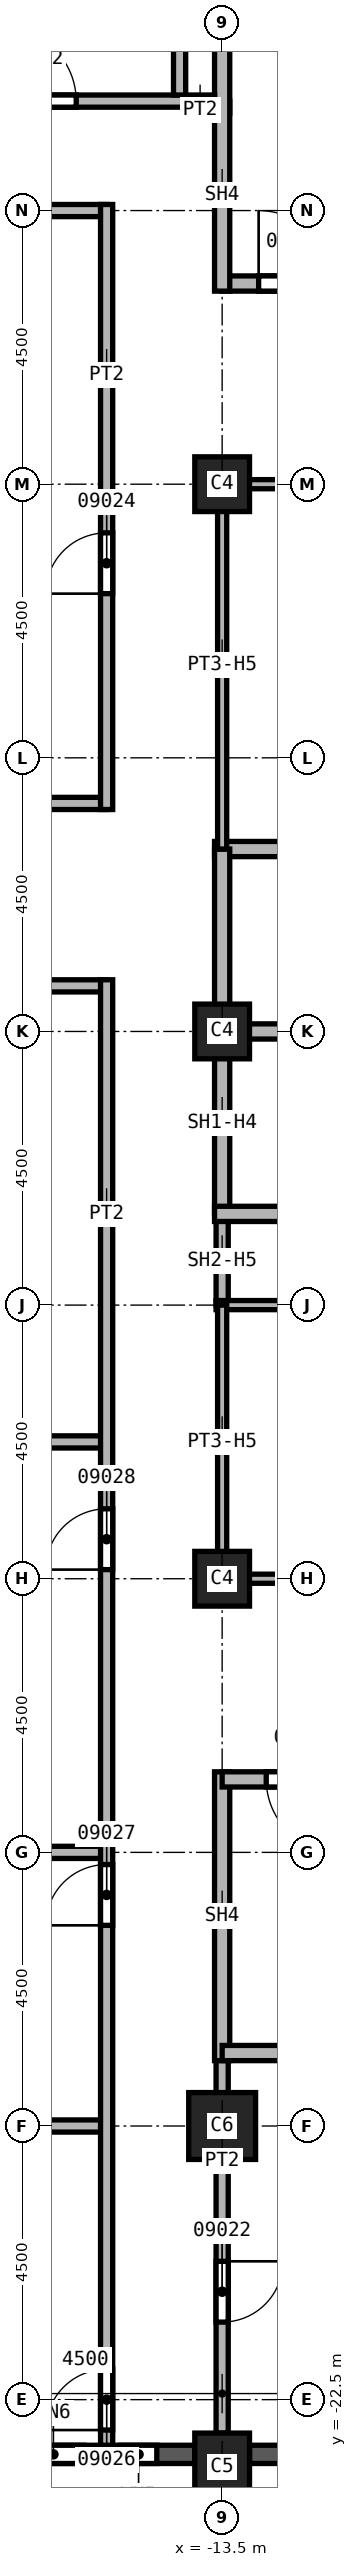
"""IFC4 building model, lengths in metres.
Left out: names, types, materials, properties, quantities, classifications, styles, units other than length and angle.
Written with IfcOpenShell. Run it as: python <this file> out.ifc"""

import sys

from ifc_helpers import new_model, si_unit, direction, frame, frame_2d, origin, origin_2d, place, context, subcontext, project, spatial, rectangle, extrude, element, fill, save


model = new_model("IFC4")
c1 = context("Model", 3, precision=1e-05, world=origin(), true_north=direction((0.0, 1.0)))
c2 = subcontext(c1, "Body", "Model", "MODEL_VIEW")
j1 = project(units=[si_unit("LENGTHUNIT", "METRE"), si_unit("PLANEANGLEUNIT", "RADIAN")], contexts=[c1])
p1 = place(None, origin())
s1 = spatial("IfcSite", under=j1, at=p1, CompositionType="ELEMENT")
p2 = place(p1, origin())
s2 = spatial("IfcBuilding", under=s1, at=p2, CompositionType="ELEMENT")
p3 = place(p2, frame((0.0, 0.0, 166.0)))
s3 = spatial("IfcBuildingStorey", under=s2, at=p3, CompositionType="ELEMENT", Elevation=166.0)
p4 = place(p3, frame((-13.5, -18.0, 0.0), z_axis=(0.0, 0.0, 1.0), x_axis=(1.0, 0.0, 0.0)))
e1 = element("IfcColumn", 1, at=p4, inside=s3, PredefinedType="COLUMN", context=c2, shape_type="SweptSolid", body=[
    extrude(rectangle(XDim=1.1, YDim=1.1, at=origin_2d()), origin(), (0.0, 0.0, 1.0), 3.7),
])
for number, where, z_axis, x_axis in (
    (2, (-13.5, 0.0, 0.0), (0.0, 0.0, 1.0), (1.0, 0.0, 0.0)),
    (3, (-13.5, 9.0, 0.0), (0.0, 0.0, 1.0), (1.0, 0.0, 0.0)),
    (4, (-13.5, -9.0, 0.0), (0.0, 0.0, 1.0), (1.0, 0.0, 0.0)),
):
    element("IfcColumn", number, at=place(p3, frame(where, z_axis=z_axis, x_axis=x_axis)), inside=s3, PredefinedType="COLUMN", context=c2, shape_type="SweptSolid", body=[
        extrude(rectangle(XDim=0.9, YDim=0.9, at=origin_2d()), origin(), (0.0, 0.0, 1.0), 3.7),
    ])
p5 = place(p3, frame((-13.5, -23.6, 0.0), z_axis=(0.0, 0.0, 1.0), x_axis=(1.0, 0.0, 0.0)))
e5 = element("IfcColumn", 5, at=p5, inside=s3, PredefinedType="COLUMN", context=c2, shape_type="SweptSolid", body=[
    extrude(rectangle(XDim=0.9, YDim=1.1, at=origin_2d()), origin(), (0.0, 0.0, 1.0), 3.7),
])
p6 = place(p3, frame((-17.55, -23.4, 0.0), z_axis=(0.0, 0.0, 1.0), x_axis=(1.0, 0.0, 0.0)))
e6 = element("IfcWall", 6, at=p6, inside=s3, PredefinedType="SOLIDWALL", context=c2, shape_type="SweptSolid", body=[
    extrude(rectangle(XDim=3.6, YDim=0.3, at=frame_2d((1.8, 0.0))), origin(), (0.0, 0.0, 1.0), 3.1),
])
p7 = place(p6, frame((0.775, 0.0, 0.8)))
e7 = element("IfcOpeningElement", 7, at=p7, cuts=e6, PredefinedType="OPENING", context=c2, shape_type="SweptSolid", body=[
    extrude(rectangle(XDim=1.0, YDim=1.95, at=frame_2d((0.5, 0.975))), frame((0.0, 0.15, 0.0), z_axis=(0.0, -1.0, 0.0), x_axis=(1.0, 0.0, 0.0)), (0.0, 0.0, 1.0), 0.3),
])
p8 = place(p6, frame((2.375, 0.0, 0.8)))
e8 = element("IfcOpeningElement", 8, at=p8, cuts=e6, PredefinedType="OPENING", context=c2, shape_type="SweptSolid", body=[
    extrude(rectangle(XDim=0.6, YDim=1.95, at=frame_2d((0.3, 0.975))), frame((0.0, 0.15, 0.0), z_axis=(0.0, -1.0, 0.0), x_axis=(1.0, 0.0, 0.0)), (0.0, 0.0, 1.0), 0.3),
])
p9 = place(p3, frame((-13.05, -23.4, 0.0), z_axis=(0.0, 0.0, 1.0), x_axis=(1.0, 0.0, 0.0)))
e9 = element("IfcWall", 9, at=p9, inside=s3, PredefinedType="SOLIDWALL", context=c2, shape_type="SweptSolid", body=[
    extrude(rectangle(XDim=3.6, YDim=0.3, at=frame_2d((1.8, 0.0))), origin(), (0.0, 0.0, 1.0), 3.1),
])
p10 = place(p9, frame((0.6, 0.0, 0.8)))
e10 = element("IfcOpeningElement", 10, at=p10, cuts=e9, PredefinedType="OPENING", context=c2, shape_type="SweptSolid", body=[
    extrude(rectangle(XDim=2.4, YDim=1.95, at=frame_2d((1.2, 0.975))), frame((0.0, 0.15, 0.0), z_axis=(0.0, -1.0, 0.0), x_axis=(1.0, 0.0, 0.0)), (0.0, 0.0, 1.0), 0.3),
])
p11 = place(p3, frame((-33.85, 3.75, 0.0), z_axis=(0.0, 0.0, 1.0), x_axis=(1.0, 0.0, 0.0)))
e11 = element("IfcWall", 11, at=p11, inside=s3, PredefinedType="PARTITIONING", context=c2, shape_type="SweptSolid", body=[
    extrude(rectangle(XDim=18.45, YDim=0.2, at=frame_2d((9.225, 0.0))), origin(), (0.0, 0.0, 1.0), 3.7),
])
p12 = place(p11, frame((2.5, 0.0, 0.0)))
e12 = element("IfcOpeningElement", 12, at=p12, cuts=e11, PredefinedType="OPENING", context=c2, shape_type="SweptSolid", body=[
    extrude(rectangle(XDim=1.0, YDim=2.1, at=frame_2d((0.5, 1.05))), frame((0.0, 0.1, 0.0), z_axis=(0.0, -1.0, 0.0), x_axis=(1.0, 0.0, 0.0)), (0.0, 0.0, 1.0), 0.2),
])
for number, where, z_axis, x_axis in (
    (13, (-27.1, -13.5, 0.0), (0.0, 0.0, 1.0), (1.0, 0.0, 0.0)),
    (14, (-27.1, -6.75, 0.0), (0.0, 0.0, 1.0), (1.0, 0.0, 0.0)),
):
    element("IfcWall", number, at=place(p3, frame(where, z_axis=z_axis, x_axis=x_axis)), inside=s3, PredefinedType="PARTITIONING", context=c2, shape_type="SweptSolid", body=[
        extrude(rectangle(XDim=11.7, YDim=0.2, at=frame_2d((5.85, 0.0))), origin(), (0.0, 0.0, 1.0), 3.7),
    ])
p13 = place(p3, frame((-15.4, 0.75, 0.0), z_axis=(0.0, 0.0, 1.0), x_axis=(-1.0, 0.0, 0.0)))
e15 = element("IfcWall", 15, at=p13, inside=s3, PredefinedType="PARTITIONING", context=c2, shape_type="SweptSolid", body=[
    extrude(rectangle(XDim=18.45, YDim=0.2, at=frame_2d((9.225, 0.0))), origin(), (0.0, 0.0, 1.0), 3.7),
])
p14 = place(p13, frame((5.35, 0.0, 0.0)))
e16 = element("IfcOpeningElement", 16, at=p14, cuts=e15, PredefinedType="OPENING", context=c2, shape_type="SweptSolid", body=[
    extrude(rectangle(XDim=1.0, YDim=2.1, at=frame_2d((0.5, 1.05))), frame((0.0, 0.1, 0.0), z_axis=(0.0, -1.0, 0.0), x_axis=(1.0, 0.0, 0.0)), (0.0, 0.0, 1.0), 0.2),
])
p15 = place(p3, frame((-24.2, -18.0, 0.0), z_axis=(0.0, 0.0, 1.0), x_axis=(1.0, 0.0, 0.0)))
e17 = element("IfcWall", 17, at=p15, inside=s3, PredefinedType="PARTITIONING", context=c2, shape_type="SweptSolid", body=[
    extrude(rectangle(XDim=8.8, YDim=0.2, at=frame_2d((4.4, 0.0))), origin(), (0.0, 0.0, 1.0), 3.7),
])
p16 = place(p3, frame((-15.4, 13.5, 0.0), z_axis=(0.0, 0.0, 1.0), x_axis=(-1.0, 0.0, 0.0)))
e18 = element("IfcWall", 18, at=p16, inside=s3, PredefinedType="PARTITIONING", context=c2, shape_type="SweptSolid", body=[
    extrude(rectangle(XDim=6.6, YDim=0.2, at=frame_2d((3.3, 0.0))), origin(), (0.0, 0.0, 1.0), 3.7),
])
p17 = place(p3, frame((-15.4, -23.25, 0.0), z_axis=(0.0, 0.0, 1.0), x_axis=(0.0, 1.0, 0.0)))
e19 = element("IfcWall", 19, at=p17, inside=s3, PredefinedType="PARTITIONING", context=c2, shape_type="SweptSolid", body=[
    extrude(rectangle(XDim=24.1, YDim=0.2, at=frame_2d((12.05, 0.0))), origin(), (0.0, 0.0, 1.0), 3.7),
])
p18 = place(p17, frame((0.25, 0.0, 0.0)))
e20 = element("IfcOpeningElement", 20, at=p18, cuts=e19, PredefinedType="OPENING", context=c2, shape_type="SweptSolid", body=[
    extrude(rectangle(XDim=1.0, YDim=2.1, at=frame_2d((0.5, 1.05))), frame((0.0, 0.1, 0.0), z_axis=(0.0, -1.0, 0.0), x_axis=(1.0, 0.0, 0.0)), (0.0, 0.0, 1.0), 0.2),
])
p19 = place(p17, frame((8.55, 0.0, 0.0)))
e21 = element("IfcOpeningElement", 21, at=p19, cuts=e19, PredefinedType="OPENING", context=c2, shape_type="SweptSolid", body=[
    extrude(rectangle(XDim=1.0, YDim=2.1, at=frame_2d((0.5, 1.05))), frame((0.0, 0.1, 0.0), z_axis=(0.0, -1.0, 0.0), x_axis=(1.0, 0.0, 0.0)), (0.0, 0.0, 1.0), 0.2),
])
p20 = place(p17, frame((14.4, 0.0, 0.0)))
e22 = element("IfcOpeningElement", 22, at=p20, cuts=e19, PredefinedType="OPENING", context=c2, shape_type="SweptSolid", body=[
    extrude(rectangle(XDim=1.0, YDim=2.1, at=frame_2d((0.5, 1.05))), frame((0.0, 0.1, 0.0), z_axis=(0.0, -1.0, 0.0), x_axis=(1.0, 0.0, 0.0)), (0.0, 0.0, 1.0), 0.2),
])
p21 = place(p3, frame((-15.4, 3.65, 0.0), z_axis=(0.0, 0.0, 1.0), x_axis=(0.0, 1.0, 0.0)))
e23 = element("IfcWall", 23, at=p21, inside=s3, PredefinedType="PARTITIONING", context=c2, shape_type="SweptSolid", body=[
    extrude(rectangle(XDim=9.95, YDim=0.2, at=frame_2d((4.975, 0.0))), origin(), (0.0, 0.0, 1.0), 3.7),
])
p22 = place(p21, frame((3.55, 0.0, 0.0)))
e24 = element("IfcOpeningElement", 24, at=p22, cuts=e23, PredefinedType="OPENING", context=c2, shape_type="SweptSolid", body=[
    extrude(rectangle(XDim=1.0, YDim=2.1, at=frame_2d((0.5, 1.05))), frame((0.0, 0.1, 0.0), z_axis=(0.0, -1.0, 0.0), x_axis=(1.0, 0.0, 0.0)), (0.0, 0.0, 1.0), 0.2),
])
p23 = place(p3, frame((-14.1, 15.2, 0.0), z_axis=(0.0, 0.0, 1.0), x_axis=(1.0, 0.0, 0.0)))
e25 = element("IfcWall", 25, at=p23, inside=s3, PredefinedType="PARTITIONING", context=c2, shape_type="SweptSolid", body=[
    extrude(rectangle(XDim=0.725, YDim=0.2, at=frame_2d((0.363, 0.0))), origin(), (0.0, 0.0, 1.0), 3.7),
])
p24 = place(p3, frame((-13.5, -16.675, 0.0), z_axis=(0.0, 0.0, 1.0), x_axis=(0.0, -1.0, 0.0)))
e26 = element("IfcWall", 26, at=p24, inside=s3, PredefinedType="PARTITIONING", context=c2, shape_type="SweptSolid", body=[
    extrude(rectangle(XDim=6.375, YDim=0.2, at=frame_2d((3.188, 0.0))), origin(), (0.0, 0.0, 1.0), 3.7),
])
p25 = place(p24, frame((3.55, 0.0, 0.0)))
e27 = element("IfcOpeningElement", 27, at=p25, cuts=e26, PredefinedType="OPENING", context=c2, shape_type="SweptSolid", body=[
    extrude(rectangle(XDim=1.0, YDim=2.1, at=frame_2d((0.5, 1.05))), frame((0.0, 0.1, 0.0), z_axis=(0.0, -1.0, 0.0), x_axis=(1.0, 0.0, 0.0)), (0.0, 0.0, 1.0), 0.2),
])
p26 = place(p3, frame((-13.5, -4.5, 0.0), z_axis=(0.0, 0.0, 1.0), x_axis=(0.0, 1.0, 0.0)))
e28 = element("IfcWall", 28, at=p26, inside=s3, PredefinedType="SOLIDWALL", context=c2, shape_type="SweptSolid", body=[
    extrude(rectangle(XDim=1.5, YDim=0.2, at=frame_2d((0.75, 0.0))), origin(), (0.0, 0.0, 1.0), 2.938),
])
p27 = place(p3, frame((-13.625, 0.0, 0.0), z_axis=(0.0, 0.0, 1.0), x_axis=(1.0, 0.0, 0.0)))
e29 = element("IfcWall", 29, at=p27, inside=s3, PredefinedType="SOLIDWALL", context=c2, shape_type="SweptSolid", body=[
    extrude(rectangle(XDim=3.125, YDim=0.25, at=frame_2d((1.562, 0.0))), origin(), (0.0, 0.0, 1.0), 3.7),
])
p28 = place(p3, frame((-13.625, 3.0, 0.0), z_axis=(0.0, 0.0, 1.0), x_axis=(1.0, 0.0, 0.0)))
e30 = element("IfcWall", 30, at=p28, inside=s3, PredefinedType="SOLIDWALL", context=c2, shape_type="SweptSolid", body=[
    extrude(rectangle(XDim=6.125, YDim=0.25, at=frame_2d((3.062, 0.0))), origin(), (0.0, 0.0, 1.0), 3.7),
])
p29 = place(p28, frame((3.25, 0.0, 0.0)))
e31 = element("IfcOpeningElement", 31, at=p29, cuts=e30, PredefinedType="OPENING", context=c2, shape_type="SweptSolid", body=[
    extrude(rectangle(XDim=1.1, YDim=2.1, at=frame_2d((0.55, 1.05))), frame((0.0, 0.125, 0.0), z_axis=(0.0, -1.0, 0.0), x_axis=(1.0, 0.0, 0.0)), (0.0, 0.0, 1.0), 0.25),
])
p30 = place(p3, frame((-13.5, -3.0, 0.0), z_axis=(0.0, 0.0, 1.0), x_axis=(0.0, 1.0, 0.0)))
e32 = element("IfcWall", 32, at=p30, inside=s3, PredefinedType="SOLIDWALL", context=c2, shape_type="SweptSolid", body=[
    extrude(rectangle(XDim=6.0, YDim=0.25, at=frame_2d((3.0, 0.0))), origin(), (0.0, 0.0, 1.0), 2.938),
])
p31 = place(p3, frame((-13.625, -3.0, 0.0), z_axis=(0.0, 0.0, 1.0), x_axis=(1.0, 0.0, 0.0)))
e33 = element("IfcWall", 33, at=p31, inside=s3, PredefinedType="SOLIDWALL", context=c2, shape_type="SweptSolid", body=[
    extrude(rectangle(XDim=9.25, YDim=0.25, at=frame_2d((4.625, 0.0))), origin(), (0.0, 0.0, 1.0), 3.7),
])
p32 = place(p31, frame((3.25, 0.0, 0.0)))
e34 = element("IfcOpeningElement", 34, at=p32, cuts=e33, PredefinedType="OPENING", context=c2, shape_type="SweptSolid", body=[
    extrude(rectangle(XDim=1.1, YDim=2.1, at=frame_2d((0.55, 1.05))), frame((0.0, 0.125, 0.0), z_axis=(0.0, -1.0, 0.0), x_axis=(1.0, 0.0, 0.0)), (0.0, 0.0, 1.0), 0.25),
])
p33 = place(p3, frame((-13.5, -12.175, 0.0), z_axis=(0.0, 0.0, 1.0), x_axis=(0.0, -1.0, 0.0)))
e35 = element("IfcWall", 35, at=p33, inside=s3, PredefinedType="SOLIDWALL", context=c2, shape_type="SweptSolid", body=[
    extrude(rectangle(XDim=4.75, YDim=0.25, at=frame_2d((2.375, 0.0))), origin(), (0.0, 0.0, 1.0), 3.7),
])
p34 = place(p3, frame((-13.5, 12.3, 0.0), z_axis=(0.0, 0.0, 1.0), x_axis=(1.0, 0.0, 0.0)))
e36 = element("IfcWall", 36, at=p34, inside=s3, PredefinedType="SOLIDWALL", context=c2, shape_type="SweptSolid", body=[
    extrude(rectangle(XDim=9.125, YDim=0.25, at=frame_2d((4.562, 0.0))), origin(), (0.0, 0.0, 1.0), 3.7),
])
p35 = place(p34, frame((0.6, 0.0, 0.0)))
e37 = element("IfcOpeningElement", 37, at=p35, cuts=e36, PredefinedType="OPENING", context=c2, shape_type="SweptSolid", body=[
    extrude(rectangle(XDim=1.2, YDim=2.1, at=frame_2d((0.6, 1.05))), frame((0.0, 0.125, 0.0), z_axis=(0.0, -1.0, 0.0), x_axis=(1.0, 0.0, 0.0)), (0.0, 0.0, 1.0), 0.25),
])
p36 = place(p3, frame((-13.5, 12.175, 0.0), z_axis=(0.0, 0.0, 1.0), x_axis=(0.0, 1.0, 0.0)))
e38 = element("IfcWall", 38, at=p36, inside=s3, PredefinedType="SOLIDWALL", context=c2, shape_type="SweptSolid", body=[
    extrude(rectangle(XDim=4.75, YDim=0.25, at=frame_2d((2.375, 0.0))), origin(), (0.0, 0.0, 1.0), 3.7),
])
p37 = place(p3, frame((-4.5, -16.8, 0.0), z_axis=(0.0, 0.0, 1.0), x_axis=(-1.0, 0.0, 0.0)))
e39 = element("IfcWall", 39, at=p37, inside=s3, PredefinedType="SOLIDWALL", context=c2, shape_type="SweptSolid", body=[
    extrude(rectangle(XDim=9.0, YDim=0.25, at=frame_2d((4.5, 0.0))), origin(), (0.0, 0.0, 1.0), 3.7),
])
p38 = place(p3, frame((-4.375, -12.3, 0.0), z_axis=(0.0, 0.0, 1.0), x_axis=(-1.0, 0.0, 0.0)))
e40 = element("IfcWall", 40, at=p38, inside=s3, PredefinedType="SOLIDWALL", context=c2, shape_type="SweptSolid", body=[
    extrude(rectangle(XDim=9.125, YDim=0.25, at=frame_2d((4.562, 0.0))), origin(), (0.0, 0.0, 1.0), 3.7),
])
p39 = place(p38, frame((7.2, 0.0, 0.0)))
e41 = element("IfcOpeningElement", 41, at=p39, cuts=e40, PredefinedType="OPENING", context=c2, shape_type="SweptSolid", body=[
    extrude(rectangle(XDim=1.2, YDim=2.1, at=frame_2d((0.6, 1.05))), frame((0.0, 0.125, 0.0), z_axis=(0.0, -1.0, 0.0), x_axis=(1.0, 0.0, 0.0)), (0.0, 0.0, 1.0), 0.25),
])
p40 = place(p3, frame((-13.6, -4.5, 0.0), z_axis=(0.0, 0.0, 1.0), x_axis=(1.0, 0.0, 0.0)))
e42 = element("IfcWall", 42, at=p40, inside=s3, PredefinedType="PARTITIONING", context=c2, shape_type="SweptSolid", body=[
    extrude(rectangle(XDim=3.1, YDim=0.15, at=frame_2d((1.55, 0.0))), origin(), (0.0, 0.0, 1.0), 3.7),
])
p41 = place(p3, frame((-13.5, -9.075, 0.0), z_axis=(0.0, 0.0, 1.0), x_axis=(0.0, 1.0, 0.0)))
e43 = element("IfcWall", 43, at=p41, inside=s3, PredefinedType="PARTITIONING", context=c2, shape_type="SweptSolid", body=[
    extrude(rectangle(XDim=4.575, YDim=0.15, at=frame_2d((2.288, 0.0))), origin(), (0.0, 0.0, 1.0), 2.938),
])
p42 = place(p3, frame((-13.5, 3.0, 0.0), z_axis=(0.0, 0.0, 1.0), x_axis=(0.0, 1.0, 0.0)))
e44 = element("IfcWall", 44, at=p42, inside=s3, PredefinedType="PARTITIONING", context=c2, shape_type="SweptSolid", body=[
    extrude(rectangle(XDim=6.075, YDim=0.15, at=frame_2d((3.038, 0.0))), origin(), (0.0, 0.0, 1.0), 2.938),
])
for number, where, z_axis, x_axis in (
    (45, (-13.5, 9.0, 0.0), (0.0, 0.0, 1.0), (1.0, 0.0, 0.0)),
    (46, (-10.5, -9.0, 0.0), (0.0, 0.0, 1.0), (-1.0, 0.0, 0.0)),
):
    element("IfcWall", number, at=place(p3, frame(where, z_axis=z_axis, x_axis=x_axis)), inside=s3, PredefinedType="PARTITIONING", context=c2, shape_type="SweptSolid", body=[
        extrude(rectangle(XDim=3.0, YDim=0.15, at=frame_2d((1.5, 0.0))), origin(), (0.0, 0.0, 1.0), 2.938),
    ])
p43 = place(p3, frame((-21.9, 15.3, 0.0), z_axis=(0.0, 0.0, 1.0), x_axis=(1.0, 0.0, 0.0)))
e47 = element("IfcWall", 47, at=p43, inside=s3, PredefinedType="SOLIDWALL", context=c2, shape_type="SweptSolid", body=[
    extrude(rectangle(XDim=8.275, YDim=0.2, at=frame_2d((4.137, 0.0))), origin(), (0.0, 0.0, 1.0), 3.7),
])
p44 = place(p43, frame((4.8, 0.0, 0.0)))
e48 = element("IfcOpeningElement", 48, at=p44, cuts=e47, PredefinedType="OPENING", context=c2, shape_type="SweptSolid", body=[
    extrude(rectangle(XDim=1.2, YDim=2.1, at=frame_2d((0.6, 1.05))), frame((0.0, 0.1, 0.0), z_axis=(0.0, -1.0, 0.0), x_axis=(1.0, 0.0, 0.0)), (0.0, 0.0, 1.0), 0.2),
])
p45 = place(p3, frame((-14.2, 15.4, 0.0), z_axis=(0.0, 0.0, 1.0), x_axis=(0.0, 1.0, 0.0)))
e49 = element("IfcWall", 49, at=p45, inside=s3, PredefinedType="SOLIDWALL", context=c2, shape_type="SweptSolid", body=[
    extrude(rectangle(XDim=5.9, YDim=0.2, at=frame_2d((2.95, 0.0))), origin(), (0.0, 0.0, 1.0), 3.7),
])
p46 = place(p35, origin())
e50 = element("IfcDoor", 50, at=p46, inside=s3, OperationType="SINGLE_SWING_LEFT", PredefinedType="DOOR", context=c2, shape_type="SweptSolid", body=[
    extrude(rectangle(XDim=1.2, YDim=2.1, at=frame_2d((0.6, 1.05))), frame((0.0, 0.025, 0.0), z_axis=(0.0, -1.0, 0.0), x_axis=(1.0, 0.0, 0.0)), (0.0, 0.0, 1.0), 0.05),
])
fill(e37, e50)
p47 = place(p39, origin())
e51 = element("IfcDoor", 51, at=p47, inside=s3, OperationType="SINGLE_SWING_RIGHT", PredefinedType="DOOR", context=c2, shape_type="SweptSolid", body=[
    extrude(rectangle(XDim=1.2, YDim=2.1, at=frame_2d((0.6, 1.05))), frame((0.0, 0.025, 0.0), z_axis=(0.0, -1.0, 0.0), x_axis=(1.0, 0.0, 0.0)), (0.0, 0.0, 1.0), 0.05),
])
fill(e41, e51)
p48 = place(p25, origin())
e52 = element("IfcDoor", 52, at=p48, inside=s3, OperationType="SINGLE_SWING_LEFT", PredefinedType="DOOR", context=c2, shape_type="SweptSolid", body=[
    extrude(rectangle(XDim=1.0, YDim=2.1, at=frame_2d((0.5, 1.05))), frame((0.0, 0.025, 0.0), z_axis=(0.0, -1.0, 0.0), x_axis=(1.0, 0.0, 0.0)), (0.0, 0.0, 1.0), 0.05),
])
fill(e27, e52)
p49 = place(p22, origin())
e53 = element("IfcDoor", 53, at=p49, inside=s3, OperationType="SINGLE_SWING_LEFT", PredefinedType="DOOR", context=c2, shape_type="SweptSolid", body=[
    extrude(rectangle(XDim=1.0, YDim=2.1, at=frame_2d((0.5, 1.05))), frame((0.0, 0.025, 0.0), z_axis=(0.0, -1.0, 0.0), x_axis=(1.0, 0.0, 0.0)), (0.0, 0.0, 1.0), 0.05),
])
fill(e24, e53)
p50 = place(p18, origin())
e54 = element("IfcDoor", 54, at=p50, inside=s3, OperationType="SINGLE_SWING_LEFT", PredefinedType="DOOR", context=c2, shape_type="SweptSolid", body=[
    extrude(rectangle(XDim=1.0, YDim=2.1, at=frame_2d((0.5, 1.05))), frame((0.0, 0.025, 0.0), z_axis=(0.0, -1.0, 0.0), x_axis=(1.0, 0.0, 0.0)), (0.0, 0.0, 1.0), 0.05),
])
fill(e20, e54)
p51 = place(p19, origin())
e55 = element("IfcDoor", 55, at=p51, inside=s3, OperationType="SINGLE_SWING_RIGHT", PredefinedType="DOOR", context=c2, shape_type="SweptSolid", body=[
    extrude(rectangle(XDim=1.0, YDim=2.1, at=frame_2d((0.5, 1.05))), frame((0.0, 0.025, 0.0), z_axis=(0.0, -1.0, 0.0), x_axis=(1.0, 0.0, 0.0)), (0.0, 0.0, 1.0), 0.05),
])
fill(e21, e55)
p52 = place(p20, origin())
e56 = element("IfcDoor", 56, at=p52, inside=s3, OperationType="SINGLE_SWING_LEFT", PredefinedType="DOOR", context=c2, shape_type="SweptSolid", body=[
    extrude(rectangle(XDim=1.0, YDim=2.1, at=frame_2d((0.5, 1.05))), frame((0.0, 0.025, 0.0), z_axis=(0.0, -1.0, 0.0), x_axis=(1.0, 0.0, 0.0)), (0.0, 0.0, 1.0), 0.05),
])
fill(e22, e56)
p53 = place(p44, origin())
e57 = element("IfcDoor", 57, at=p53, inside=s3, OperationType="SINGLE_SWING_RIGHT", PredefinedType="DOOR", context=c2, shape_type="SweptSolid", body=[
    extrude(rectangle(XDim=1.2, YDim=2.1, at=frame_2d((0.6, 1.05))), frame((0.0, 0.025, 0.0), z_axis=(0.0, -1.0, 0.0), x_axis=(1.0, 0.0, 0.0)), (0.0, 0.0, 1.0), 0.05),
])
fill(e48, e57)
p54 = place(p7, origin())
e58 = element("IfcWindow", 58, at=p54, inside=s3, PartitioningType="SINGLE_PANEL", PredefinedType="WINDOW", context=c2, shape_type="SweptSolid", body=[
    extrude(rectangle(XDim=1.0, YDim=1.95, at=frame_2d((0.5, 0.975))), frame((0.0, 0.03, 0.0), z_axis=(0.0, -1.0, 0.0), x_axis=(1.0, 0.0, 0.0)), (0.0, 0.0, 1.0), 0.06),
])
fill(e7, e58)
p55 = place(p8, origin())
e59 = element("IfcWindow", 59, at=p55, inside=s3, PartitioningType="SINGLE_PANEL", PredefinedType="WINDOW", context=c2, shape_type="SweptSolid", body=[
    extrude(rectangle(XDim=0.6, YDim=1.95, at=frame_2d((0.3, 0.975))), frame((0.0, 0.03, 0.0), z_axis=(0.0, -1.0, 0.0), x_axis=(1.0, 0.0, 0.0)), (0.0, 0.0, 1.0), 0.06),
])
fill(e8, e59)
save(model, sys.argv[1])
